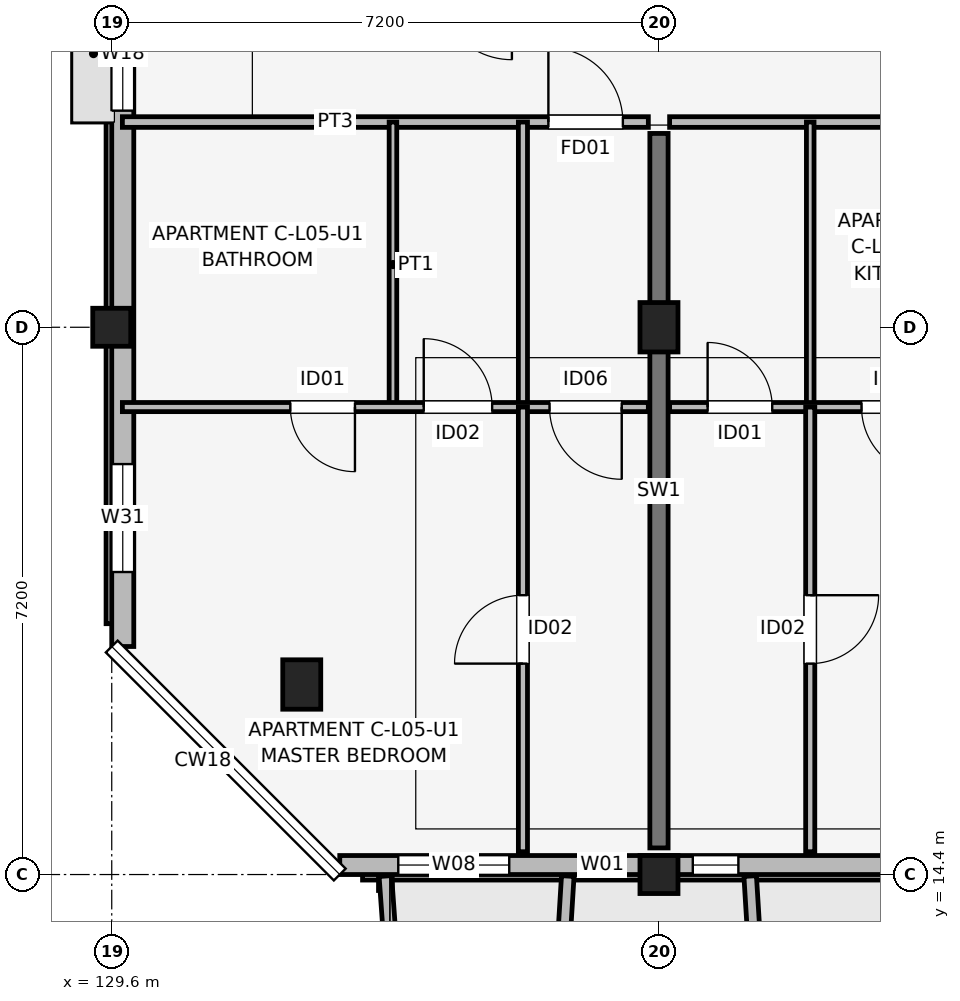
"""IFC4 building model, lengths in metres.
Left out: names, types, materials, properties, quantities, classifications, styles, units other than length and angle.
Written with IfcOpenShell. Run it as: python <this file> out.ifc"""

import sys

from ifc_helpers import new_model, si_unit, direction, frame, frame_2d, origin, origin_2d, place, context, subcontext, project, spatial, rectangle, extrude, element, fill, save


model = new_model("IFC4")
c1 = context("Model", 3, precision=1e-05, world=origin(), true_north=direction((0.0, 1.0)))
c2 = subcontext(c1, "Body", "Model", "MODEL_VIEW")
j1 = project(units=[si_unit("LENGTHUNIT", "METRE"), si_unit("PLANEANGLEUNIT", "RADIAN")], contexts=[c1])
p1 = place(None, origin())
s1 = spatial("IfcSite", under=j1, at=p1, CompositionType="ELEMENT")
p2 = place(p1, origin())
s2 = spatial("IfcBuilding", under=s1, at=p2, CompositionType="ELEMENT")
p3 = place(p2, frame((0.0, 0.0, 18.15)))
s3 = spatial("IfcBuildingStorey", under=s2, at=p3, CompositionType="ELEMENT", Elevation=18.15)
p4 = place(p3, frame((132.1, 16.9, 0.0), z_axis=(0.0, 0.0, 1.0), x_axis=(1.0, 0.0, 0.0)))
e1 = element("IfcColumn", 1, at=p4, inside=s3, PredefinedType="COLUMN", context=c2, shape_type="SweptSolid", body=[
    extrude(rectangle(XDim=0.5, YDim=0.65, at=origin_2d()), origin(), (0.0, 0.0, 1.0), 3.15),
])
for number, where, z_axis, x_axis in (
    (2, (129.6, 21.6, 0.0), (0.0, 0.0, 1.0), (1.0, 0.0, 0.0)),
    (3, (136.8, 14.4, 0.0), (0.0, 0.0, 1.0), (1.0, 0.0, 0.0)),
):
    element("IfcColumn", number, at=place(p3, frame(where, z_axis=z_axis, x_axis=x_axis)), inside=s3, PredefinedType="COLUMN", context=c2, shape_type="SweptSolid", body=[
        extrude(rectangle(XDim=0.5, YDim=0.5, at=origin_2d()), origin(), (0.0, 0.0, 1.0), 3.15),
    ])
p5 = place(p3, frame((136.8, 21.6, 0.0), z_axis=(0.0, 0.0, 1.0), x_axis=(1.0, 0.0, 0.0)))
e4 = element("IfcColumn", 4, at=p5, inside=s3, PredefinedType="COLUMN", context=c2, shape_type="SweptSolid", body=[
    extrude(rectangle(XDim=0.5, YDim=0.65, at=origin_2d()), origin(), (0.0, 0.0, 1.0), 3.15),
])
p6 = place(p3, frame((136.8, 14.75, 0.0), z_axis=(0.0, 0.0, 1.0), x_axis=(0.0, 1.0, 0.0)))
e5 = element("IfcWall", 5, at=p6, inside=s3, PredefinedType="SHEAR", context=c2, shape_type="SweptSolid", body=[
    extrude(rectangle(XDim=9.4, YDim=0.24, at=frame_2d((4.7, 0.0))), origin(), (0.0, 0.0, 1.0), 3.15),
])
p7 = place(p3, frame((132.6, 14.525, 0.0), z_axis=(0.0, 0.0, 1.0), x_axis=(1.0, 0.0, 0.0)))
e6 = element("IfcWall", 6, at=p7, inside=s3, PredefinedType="SOLIDWALL", context=c2, shape_type="SweptSolid", body=[
    extrude(rectangle(XDim=30.0, YDim=0.25, at=frame_2d((15.0, 0.0))), origin(), (0.0, 0.0, 1.0), 2.43),
])
p8 = place(p7, frame((9.825, 0.0, 0.0), z_axis=(0.0, 0.0, 1.0), x_axis=(-1.0, 0.0, 0.0)))
e7 = element("IfcOpeningElement", 7, at=p8, cuts=e6, PredefinedType="OPENING", context=c2, shape_type="SweptSolid", body=[
    extrude(rectangle(XDim=1.65, YDim=2.15, at=frame_2d((0.825, 1.075))), frame((0.0, 0.135, 0.0), z_axis=(0.0, -1.0, 0.0), x_axis=(1.0, 0.0, 0.0)), (0.0, 0.0, 1.0), 0.27),
])
p9 = place(p7, frame((24.15, 0.0, 0.0), z_axis=(0.0, 0.0, 1.0), x_axis=(-1.0, 0.0, 0.0)))
e8 = element("IfcOpeningElement", 8, at=p9, cuts=e6, PredefinedType="OPENING", context=c2, shape_type="SweptSolid", body=[
    extrude(rectangle(XDim=1.5, YDim=2.15, at=frame_2d((0.75, 1.075))), frame((0.0, 0.135, 0.0), z_axis=(0.0, -1.0, 0.0), x_axis=(1.0, 0.0, 0.0)), (0.0, 0.0, 1.0), 0.27),
])
p10 = place(p7, frame((0.77, 0.0, 0.7)))
e9 = element("IfcOpeningElement", 9, at=p10, cuts=e6, PredefinedType="OPENING", context=c2, shape_type="SweptSolid", body=[
    extrude(rectangle(XDim=1.46, YDim=1.55, at=frame_2d((0.73, 0.775))), frame((0.0, 0.135, 0.0), z_axis=(0.0, -1.0, 0.0), x_axis=(1.0, 0.0, 0.0)), (0.0, 0.0, 1.0), 0.27),
])
p11 = place(p7, frame((3.155, 0.0, 0.75)))
e10 = element("IfcOpeningElement", 10, at=p11, cuts=e6, PredefinedType="OPENING", context=c2, shape_type="SweptSolid", body=[
    extrude(rectangle(XDim=0.6, YDim=1.25, at=frame_2d((0.3, 0.625))), frame((0.0, 0.135, 0.0), z_axis=(0.0, -1.0, 0.0), x_axis=(1.0, 0.0, 0.0)), (0.0, 0.0, 1.0), 0.27),
])
p12 = place(p7, frame((4.645, 0.0, 0.75)))
e11 = element("IfcOpeningElement", 11, at=p12, cuts=e6, PredefinedType="OPENING", context=c2, shape_type="SweptSolid", body=[
    extrude(rectangle(XDim=0.6, YDim=1.25, at=frame_2d((0.3, 0.625))), frame((0.0, 0.135, 0.0), z_axis=(0.0, -1.0, 0.0), x_axis=(1.0, 0.0, 0.0)), (0.0, 0.0, 1.0), 0.27),
])
p13 = place(p7, frame((12.8, 0.0, 0.67)))
e12 = element("IfcOpeningElement", 12, at=p13, cuts=e6, PredefinedType="OPENING", context=c2, shape_type="SweptSolid", body=[
    extrude(rectangle(XDim=2.0, YDim=1.65, at=frame_2d((1.0, 0.825))), frame((0.0, 0.135, 0.0), z_axis=(0.0, -1.0, 0.0), x_axis=(1.0, 0.0, 0.0)), (0.0, 0.0, 1.0), 0.27),
])
p14 = place(p7, frame((15.885, 0.0, 0.75)))
e13 = element("IfcOpeningElement", 13, at=p14, cuts=e6, PredefinedType="OPENING", context=c2, shape_type="SweptSolid", body=[
    extrude(rectangle(XDim=0.98, YDim=1.45, at=frame_2d((0.49, 0.725))), frame((0.0, 0.135, 0.0), z_axis=(0.0, -1.0, 0.0), x_axis=(1.0, 0.0, 0.0)), (0.0, 0.0, 1.0), 0.27),
])
p15 = place(p7, frame((19.045, 0.0, 0.75)))
e14 = element("IfcOpeningElement", 14, at=p15, cuts=e6, PredefinedType="OPENING", context=c2, shape_type="SweptSolid", body=[
    extrude(rectangle(XDim=0.6, YDim=1.25, at=frame_2d((0.3, 0.625))), frame((0.0, 0.135, 0.0), z_axis=(0.0, -1.0, 0.0), x_axis=(1.0, 0.0, 0.0)), (0.0, 0.0, 1.0), 0.27),
])
p16 = place(p7, frame((26.245, 0.0, 0.75)))
e15 = element("IfcOpeningElement", 15, at=p16, cuts=e6, PredefinedType="OPENING", context=c2, shape_type="SweptSolid", body=[
    extrude(rectangle(XDim=0.6, YDim=1.25, at=frame_2d((0.3, 0.625))), frame((0.0, 0.135, 0.0), z_axis=(0.0, -1.0, 0.0), x_axis=(1.0, 0.0, 0.0)), (0.0, 0.0, 1.0), 0.27),
])
p17 = place(p7, frame((28.02, 0.0, 0.75)))
e16 = element("IfcOpeningElement", 16, at=p17, cuts=e6, PredefinedType="OPENING", context=c2, shape_type="SweptSolid", body=[
    extrude(rectangle(XDim=1.22, YDim=1.5, at=frame_2d((0.61, 0.75))), frame((0.0, 0.135, 0.0), z_axis=(0.0, -1.0, 0.0), x_axis=(1.0, 0.0, 0.0)), (0.0, 0.0, 1.0), 0.27),
])
p18 = place(p3, frame((129.745, 33.0, 0.0), z_axis=(0.0, 0.0, 1.0), x_axis=(0.0, -1.0, 0.0)))
e17 = element("IfcWall", 17, at=p18, inside=s3, PredefinedType="SOLIDWALL", context=c2, shape_type="SweptSolid", body=[
    extrude(rectangle(XDim=15.6, YDim=0.29, at=frame_2d((7.8, 0.0))), origin(), (0.0, 0.0, 1.0), 2.38),
])
p19 = place(p18, frame((7.05, 0.0, 1.05)))
e18 = element("IfcOpeningElement", 18, at=p19, cuts=e17, PredefinedType="OPENING", context=c2, shape_type="SweptSolid", body=[
    extrude(rectangle(XDim=1.5, YDim=1.15, at=frame_2d((0.75, 0.575))), frame((0.0, 0.155, 0.0), z_axis=(0.0, -1.0, 0.0), x_axis=(1.0, 0.0, 0.0)), (0.0, 0.0, 1.0), 0.31),
])
p20 = place(p18, frame((13.2, 0.0, 0.67)))
e19 = element("IfcOpeningElement", 19, at=p20, cuts=e17, PredefinedType="OPENING", context=c2, shape_type="SweptSolid", body=[
    extrude(rectangle(XDim=1.42, YDim=1.6, at=frame_2d((0.71, 0.8))), frame((0.0, 0.155, 0.0), z_axis=(0.0, -1.0, 0.0), x_axis=(1.0, 0.0, 0.0)), (0.0, 0.0, 1.0), 0.31),
])
p21 = place(p3, frame((133.2, 14.38, 0.0), z_axis=(0.0, 0.0, 1.0), x_axis=(0.071317687608, -0.997453651772, 0.0)))
e20 = element("IfcWall", 20, at=p21, inside=s3, PredefinedType="ELEMENTEDWALL", context=c2, shape_type="SweptSolid", body=[
    extrude(rectangle(XDim=1.965, YDim=0.165, at=frame_2d((0.982, 0.0))), origin(), (0.0, 0.0, 1.0), 2.95),
])
p22 = place(p3, frame((135.6, 14.38, 0.0), z_axis=(0.0, 0.0, 1.0), x_axis=(-0.061170732449, -0.998127317276, 0.0)))
e21 = element("IfcWall", 21, at=p22, inside=s3, PredefinedType="ELEMENTEDWALL", context=c2, shape_type="SweptSolid", body=[
    extrude(rectangle(XDim=1.964, YDim=0.165, at=frame_2d((0.982, 0.0))), origin(), (0.0, 0.0, 1.0), 2.95),
])
p23 = place(p3, frame((138.0, 14.38, 0.0), z_axis=(0.0, 0.0, 1.0), x_axis=(0.061170732449, -0.998127317276, 0.0)))
e22 = element("IfcWall", 22, at=p23, inside=s3, PredefinedType="ELEMENTEDWALL", context=c2, shape_type="SweptSolid", body=[
    extrude(rectangle(XDim=1.964, YDim=0.165, at=frame_2d((0.982, 0.0))), origin(), (0.0, 0.0, 1.0), 2.55),
])
p24 = place(p3, frame((129.74, 24.3, 0.0), z_axis=(0.0, 0.0, 1.0), x_axis=(1.0, 0.0, 0.0)))
e23 = element("IfcWall", 23, at=p24, inside=s3, PredefinedType="PARTITIONING", context=c2, shape_type="SweptSolid", body=[
    extrude(rectangle(XDim=6.92, YDim=0.14, at=frame_2d((3.46, 0.0))), origin(), (0.0, 0.0, 1.0), 2.38),
])
p25 = place(p24, frame((5.605, 0.0, 0.0)))
e24 = element("IfcOpeningElement", 24, at=p25, cuts=e23, PredefinedType="OPENING", context=c2, shape_type="SweptSolid", body=[
    extrude(rectangle(XDim=0.98, YDim=2.1, at=frame_2d((0.49, 1.05))), frame((0.0, 0.08, 0.0), z_axis=(0.0, -1.0, 0.0), x_axis=(1.0, 0.0, 0.0)), (0.0, 0.0, 1.0), 0.16),
])
p26 = place(p3, frame((133.3, 20.55, 0.0), z_axis=(0.0, 0.0, 1.0), x_axis=(0.0, 1.0, 0.0)))
e25 = element("IfcWall", 25, at=p26, inside=s3, PredefinedType="PARTITIONING", context=c2, shape_type="SweptSolid", body=[
    extrude(rectangle(XDim=3.75, YDim=0.1, at=frame_2d((1.875, 0.0))), origin(), (0.0, 0.0, 1.0), 2.375),
])
p27 = place(p3, frame((135.01, 20.55, 0.0), z_axis=(0.0, 0.0, 1.0), x_axis=(0.0, 1.0, 0.0)))
e26 = element("IfcWall", 26, at=p27, inside=s3, PredefinedType="PARTITIONING", context=c2, shape_type="SweptSolid", body=[
    extrude(rectangle(XDim=3.75, YDim=0.12, at=frame_2d((1.875, 0.0))), origin(), (0.0, 0.0, 1.0), 2.375),
])
p28 = place(p3, frame((129.74, 20.55, 0.0), z_axis=(0.0, 0.0, 1.0), x_axis=(1.0, 0.0, 0.0)))
e27 = element("IfcWall", 27, at=p28, inside=s3, PredefinedType="PARTITIONING", context=c2, shape_type="SweptSolid", body=[
    extrude(rectangle(XDim=6.92, YDim=0.12, at=frame_2d((3.46, 0.0))), origin(), (0.0, 0.0, 1.0), 2.38),
])
p29 = place(p28, frame((3.06, 0.0, 0.0), z_axis=(0.0, 0.0, 1.0), x_axis=(-1.0, 0.0, 0.0)))
e28 = element("IfcOpeningElement", 28, at=p29, cuts=e27, PredefinedType="OPENING", context=c2, shape_type="SweptSolid", body=[
    extrude(rectangle(XDim=0.85, YDim=2.08, at=frame_2d((0.425, 1.04))), frame((0.0, 0.07, 0.0), z_axis=(0.0, -1.0, 0.0), x_axis=(1.0, 0.0, 0.0)), (0.0, 0.0, 1.0), 0.14),
])
p30 = place(p28, frame((3.965, 0.0, 0.0)))
e29 = element("IfcOpeningElement", 29, at=p30, cuts=e27, PredefinedType="OPENING", context=c2, shape_type="SweptSolid", body=[
    extrude(rectangle(XDim=0.9, YDim=2.08, at=frame_2d((0.45, 1.04))), frame((0.0, 0.07, 0.0), z_axis=(0.0, -1.0, 0.0), x_axis=(1.0, 0.0, 0.0)), (0.0, 0.0, 1.0), 0.14),
])
p31 = place(p28, frame((6.57, 0.0, 0.0), z_axis=(0.0, 0.0, 1.0), x_axis=(-1.0, 0.0, 0.0)))
e30 = element("IfcOpeningElement", 30, at=p31, cuts=e27, PredefinedType="OPENING", context=c2, shape_type="SweptSolid", body=[
    extrude(rectangle(XDim=0.95, YDim=2.08, at=frame_2d((0.475, 1.04))), frame((0.0, 0.07, 0.0), z_axis=(0.0, -1.0, 0.0), x_axis=(1.0, 0.0, 0.0)), (0.0, 0.0, 1.0), 0.14),
])
p32 = place(p3, frame((135.01, 14.7, 0.0), z_axis=(0.0, 0.0, 1.0), x_axis=(0.0, 1.0, 0.0)))
e31 = element("IfcWall", 31, at=p32, inside=s3, PredefinedType="PARTITIONING", context=c2, shape_type="SweptSolid", body=[
    extrude(rectangle(XDim=5.85, YDim=0.12, at=frame_2d((2.925, 0.0))), origin(), (0.0, 0.0, 1.0), 2.38),
])
p33 = place(p32, frame((2.475, 0.0, 0.0)))
e32 = element("IfcOpeningElement", 32, at=p33, cuts=e31, PredefinedType="OPENING", context=c2, shape_type="SweptSolid", body=[
    extrude(rectangle(XDim=0.9, YDim=2.08, at=frame_2d((0.45, 1.04))), frame((0.0, 0.07, 0.0), z_axis=(0.0, -1.0, 0.0), x_axis=(1.0, 0.0, 0.0)), (0.0, 0.0, 1.0), 0.14),
])
p34 = place(p3, frame((136.94, 24.3, 0.0), z_axis=(0.0, 0.0, 1.0), x_axis=(1.0, 0.0, 0.0)))
e33 = element("IfcWall", 33, at=p34, inside=s3, PredefinedType="PARTITIONING", context=c2, shape_type="SweptSolid", body=[
    extrude(rectangle(XDim=6.92, YDim=0.14, at=frame_2d((3.46, 0.0))), origin(), (0.0, 0.0, 1.0), 2.38),
])
p35 = place(p34, frame((6.0, 0.0, 0.0), z_axis=(0.0, 0.0, 1.0), x_axis=(-1.0, 0.0, 0.0)))
e34 = element("IfcOpeningElement", 34, at=p35, cuts=e33, PredefinedType="OPENING", context=c2, shape_type="SweptSolid", body=[
    extrude(rectangle(XDim=0.98, YDim=2.1, at=frame_2d((0.49, 1.05))), frame((0.0, 0.08, 0.0), z_axis=(0.0, -1.0, 0.0), x_axis=(1.0, 0.0, 0.0)), (0.0, 0.0, 1.0), 0.16),
])
p36 = place(p3, frame((138.79, 20.55, 0.0), z_axis=(0.0, 0.0, 1.0), x_axis=(0.0, 1.0, 0.0)))
e35 = element("IfcWall", 35, at=p36, inside=s3, PredefinedType="PARTITIONING", context=c2, shape_type="SweptSolid", body=[
    extrude(rectangle(XDim=3.75, YDim=0.1, at=frame_2d((1.875, 0.0))), origin(), (0.0, 0.0, 1.0), 2.375),
])
p37 = place(p3, frame((136.94, 20.55, 0.0), z_axis=(0.0, 0.0, 1.0), x_axis=(1.0, 0.0, 0.0)))
e36 = element("IfcWall", 36, at=p37, inside=s3, PredefinedType="PARTITIONING", context=c2, shape_type="SweptSolid", body=[
    extrude(rectangle(XDim=6.92, YDim=0.12, at=frame_2d((3.46, 0.0))), origin(), (0.0, 0.0, 1.0), 2.38),
])
p38 = place(p37, frame((0.5, 0.0, 0.0)))
e37 = element("IfcOpeningElement", 37, at=p38, cuts=e36, PredefinedType="OPENING", context=c2, shape_type="SweptSolid", body=[
    extrude(rectangle(XDim=0.85, YDim=2.08, at=frame_2d((0.425, 1.04))), frame((0.0, 0.07, 0.0), z_axis=(0.0, -1.0, 0.0), x_axis=(1.0, 0.0, 0.0)), (0.0, 0.0, 1.0), 0.14),
])
p39 = place(p37, frame((3.425, 0.0, 0.0), z_axis=(0.0, 0.0, 1.0), x_axis=(-1.0, 0.0, 0.0)))
e38 = element("IfcOpeningElement", 38, at=p39, cuts=e36, PredefinedType="OPENING", context=c2, shape_type="SweptSolid", body=[
    extrude(rectangle(XDim=0.9, YDim=2.08, at=frame_2d((0.45, 1.04))), frame((0.0, 0.07, 0.0), z_axis=(0.0, -1.0, 0.0), x_axis=(1.0, 0.0, 0.0)), (0.0, 0.0, 1.0), 0.14),
])
p40 = place(p37, frame((5.035, 0.0, 0.0)))
e39 = element("IfcOpeningElement", 39, at=p40, cuts=e36, PredefinedType="OPENING", context=c2, shape_type="SweptSolid", body=[
    extrude(rectangle(XDim=0.95, YDim=2.08, at=frame_2d((0.475, 1.04))), frame((0.0, 0.07, 0.0), z_axis=(0.0, -1.0, 0.0), x_axis=(1.0, 0.0, 0.0)), (0.0, 0.0, 1.0), 0.14),
])
p41 = place(p3, frame((138.79, 14.7, 0.0), z_axis=(0.0, 0.0, 1.0), x_axis=(0.0, 1.0, 0.0)))
e40 = element("IfcWall", 40, at=p41, inside=s3, PredefinedType="PARTITIONING", context=c2, shape_type="SweptSolid", body=[
    extrude(rectangle(XDim=5.85, YDim=0.12, at=frame_2d((2.925, 0.0))), origin(), (0.0, 0.0, 1.0), 2.38),
])
p42 = place(p41, frame((3.375, 0.0, 0.0), z_axis=(0.0, 0.0, 1.0), x_axis=(-1.0, 0.0, 0.0)))
e41 = element("IfcOpeningElement", 41, at=p42, cuts=e40, PredefinedType="OPENING", context=c2, shape_type="SweptSolid", body=[
    extrude(rectangle(XDim=0.9, YDim=2.08, at=frame_2d((0.45, 1.04))), frame((0.0, 0.07, 0.0), z_axis=(0.0, -1.0, 0.0), x_axis=(1.0, 0.0, 0.0)), (0.0, 0.0, 1.0), 0.14),
])
p43 = place(p10, origin())
e42 = element("IfcWindow", 42, at=p43, inside=s3, PartitioningType="SINGLE_PANEL", PredefinedType="WINDOW", context=c2, shape_type="SweptSolid", body=[
    extrude(rectangle(XDim=1.46, YDim=1.55, at=frame_2d((0.73, 0.775))), frame((0.0, 0.03, 0.0), z_axis=(0.0, -1.0, 0.0), x_axis=(1.0, 0.0, 0.0)), (0.0, 0.0, 1.0), 0.06),
])
fill(e9, e42)
p44 = place(p11, origin())
e43 = element("IfcWindow", 43, at=p44, inside=s3, PartitioningType="SINGLE_PANEL", PredefinedType="WINDOW", context=c2, shape_type="SweptSolid", body=[
    extrude(rectangle(XDim=0.6, YDim=1.25, at=frame_2d((0.3, 0.625))), frame((0.0, 0.03, 0.0), z_axis=(0.0, -1.0, 0.0), x_axis=(1.0, 0.0, 0.0)), (0.0, 0.0, 1.0), 0.06),
])
fill(e10, e43)
p45 = place(p12, origin())
e44 = element("IfcWindow", 44, at=p45, inside=s3, PartitioningType="SINGLE_PANEL", PredefinedType="WINDOW", context=c2, shape_type="SweptSolid", body=[
    extrude(rectangle(XDim=0.6, YDim=1.25, at=frame_2d((0.3, 0.625))), frame((0.0, 0.03, 0.0), z_axis=(0.0, -1.0, 0.0), x_axis=(1.0, 0.0, 0.0)), (0.0, 0.0, 1.0), 0.06),
])
fill(e11, e44)
p46 = place(p19, origin())
e45 = element("IfcWindow", 45, at=p46, inside=s3, PartitioningType="SINGLE_PANEL", PredefinedType="WINDOW", context=c2, shape_type="SweptSolid", body=[
    extrude(rectangle(XDim=1.5, YDim=1.15, at=frame_2d((0.75, 0.575))), frame((0.0, 0.03, 0.0), z_axis=(0.0, -1.0, 0.0), x_axis=(1.0, 0.0, 0.0)), (0.0, 0.0, 1.0), 0.06),
])
fill(e18, e45)
p47 = place(p20, origin())
e46 = element("IfcWindow", 46, at=p47, inside=s3, PartitioningType="SINGLE_PANEL", PredefinedType="WINDOW", context=c2, shape_type="SweptSolid", body=[
    extrude(rectangle(XDim=1.42, YDim=1.6, at=frame_2d((0.71, 0.8))), frame((0.0, 0.03, 0.0), z_axis=(0.0, -1.0, 0.0), x_axis=(1.0, 0.0, 0.0)), (0.0, 0.0, 1.0), 0.06),
])
fill(e19, e46)
p48 = place(p25, origin())
e47 = element("IfcDoor", 47, at=p48, inside=s3, OperationType="SINGLE_SWING_LEFT", PredefinedType="DOOR", context=c2, shape_type="SweptSolid", body=[
    extrude(rectangle(XDim=0.98, YDim=2.1, at=frame_2d((0.49, 1.05))), frame((0.0, 0.025, 0.0), z_axis=(0.0, -1.0, 0.0), x_axis=(1.0, 0.0, 0.0)), (0.0, 0.0, 1.0), 0.05),
])
fill(e24, e47)
p49 = place(p29, origin())
e48 = element("IfcDoor", 48, at=p49, inside=s3, OperationType="SINGLE_SWING_RIGHT", PredefinedType="DOOR", context=c2, shape_type="SweptSolid", body=[
    extrude(rectangle(XDim=0.85, YDim=2.08, at=frame_2d((0.425, 1.04))), frame((0.0, 0.025, 0.0), z_axis=(0.0, -1.0, 0.0), x_axis=(1.0, 0.0, 0.0)), (0.0, 0.0, 1.0), 0.05),
])
fill(e28, e48)
p50 = place(p30, origin())
e49 = element("IfcDoor", 49, at=p50, inside=s3, OperationType="SINGLE_SWING_LEFT", PredefinedType="DOOR", context=c2, shape_type="SweptSolid", body=[
    extrude(rectangle(XDim=0.9, YDim=2.08, at=frame_2d((0.45, 1.04))), frame((0.0, 0.025, 0.0), z_axis=(0.0, -1.0, 0.0), x_axis=(1.0, 0.0, 0.0)), (0.0, 0.0, 1.0), 0.05),
])
fill(e29, e49)
p51 = place(p31, origin())
e50 = element("IfcDoor", 50, at=p51, inside=s3, OperationType="SINGLE_SWING_RIGHT", PredefinedType="DOOR", context=c2, shape_type="SweptSolid", body=[
    extrude(rectangle(XDim=0.95, YDim=2.08, at=frame_2d((0.475, 1.04))), frame((0.0, 0.025, 0.0), z_axis=(0.0, -1.0, 0.0), x_axis=(1.0, 0.0, 0.0)), (0.0, 0.0, 1.0), 0.05),
])
fill(e30, e50)
p52 = place(p33, origin())
e51 = element("IfcDoor", 51, at=p52, inside=s3, OperationType="SINGLE_SWING_LEFT", PredefinedType="DOOR", context=c2, shape_type="SweptSolid", body=[
    extrude(rectangle(XDim=0.9, YDim=2.08, at=frame_2d((0.45, 1.04))), frame((0.0, 0.025, 0.0), z_axis=(0.0, -1.0, 0.0), x_axis=(1.0, 0.0, 0.0)), (0.0, 0.0, 1.0), 0.05),
])
fill(e32, e51)
p53 = place(p38, origin())
e52 = element("IfcDoor", 52, at=p53, inside=s3, OperationType="SINGLE_SWING_LEFT", PredefinedType="DOOR", context=c2, shape_type="SweptSolid", body=[
    extrude(rectangle(XDim=0.85, YDim=2.08, at=frame_2d((0.425, 1.04))), frame((0.0, 0.025, 0.0), z_axis=(0.0, -1.0, 0.0), x_axis=(1.0, 0.0, 0.0)), (0.0, 0.0, 1.0), 0.05),
])
fill(e37, e52)
p54 = place(p39, origin())
e53 = element("IfcDoor", 53, at=p54, inside=s3, OperationType="SINGLE_SWING_RIGHT", PredefinedType="DOOR", context=c2, shape_type="SweptSolid", body=[
    extrude(rectangle(XDim=0.9, YDim=2.08, at=frame_2d((0.45, 1.04))), frame((0.0, 0.025, 0.0), z_axis=(0.0, -1.0, 0.0), x_axis=(1.0, 0.0, 0.0)), (0.0, 0.0, 1.0), 0.05),
])
fill(e38, e53)
p55 = place(p42, origin())
e54 = element("IfcDoor", 54, at=p55, inside=s3, OperationType="SINGLE_SWING_RIGHT", PredefinedType="DOOR", context=c2, shape_type="SweptSolid", body=[
    extrude(rectangle(XDim=0.9, YDim=2.08, at=frame_2d((0.45, 1.04))), frame((0.0, 0.025, 0.0), z_axis=(0.0, -1.0, 0.0), x_axis=(1.0, 0.0, 0.0)), (0.0, 0.0, 1.0), 0.05),
])
fill(e41, e54)
save(model, sys.argv[1])
